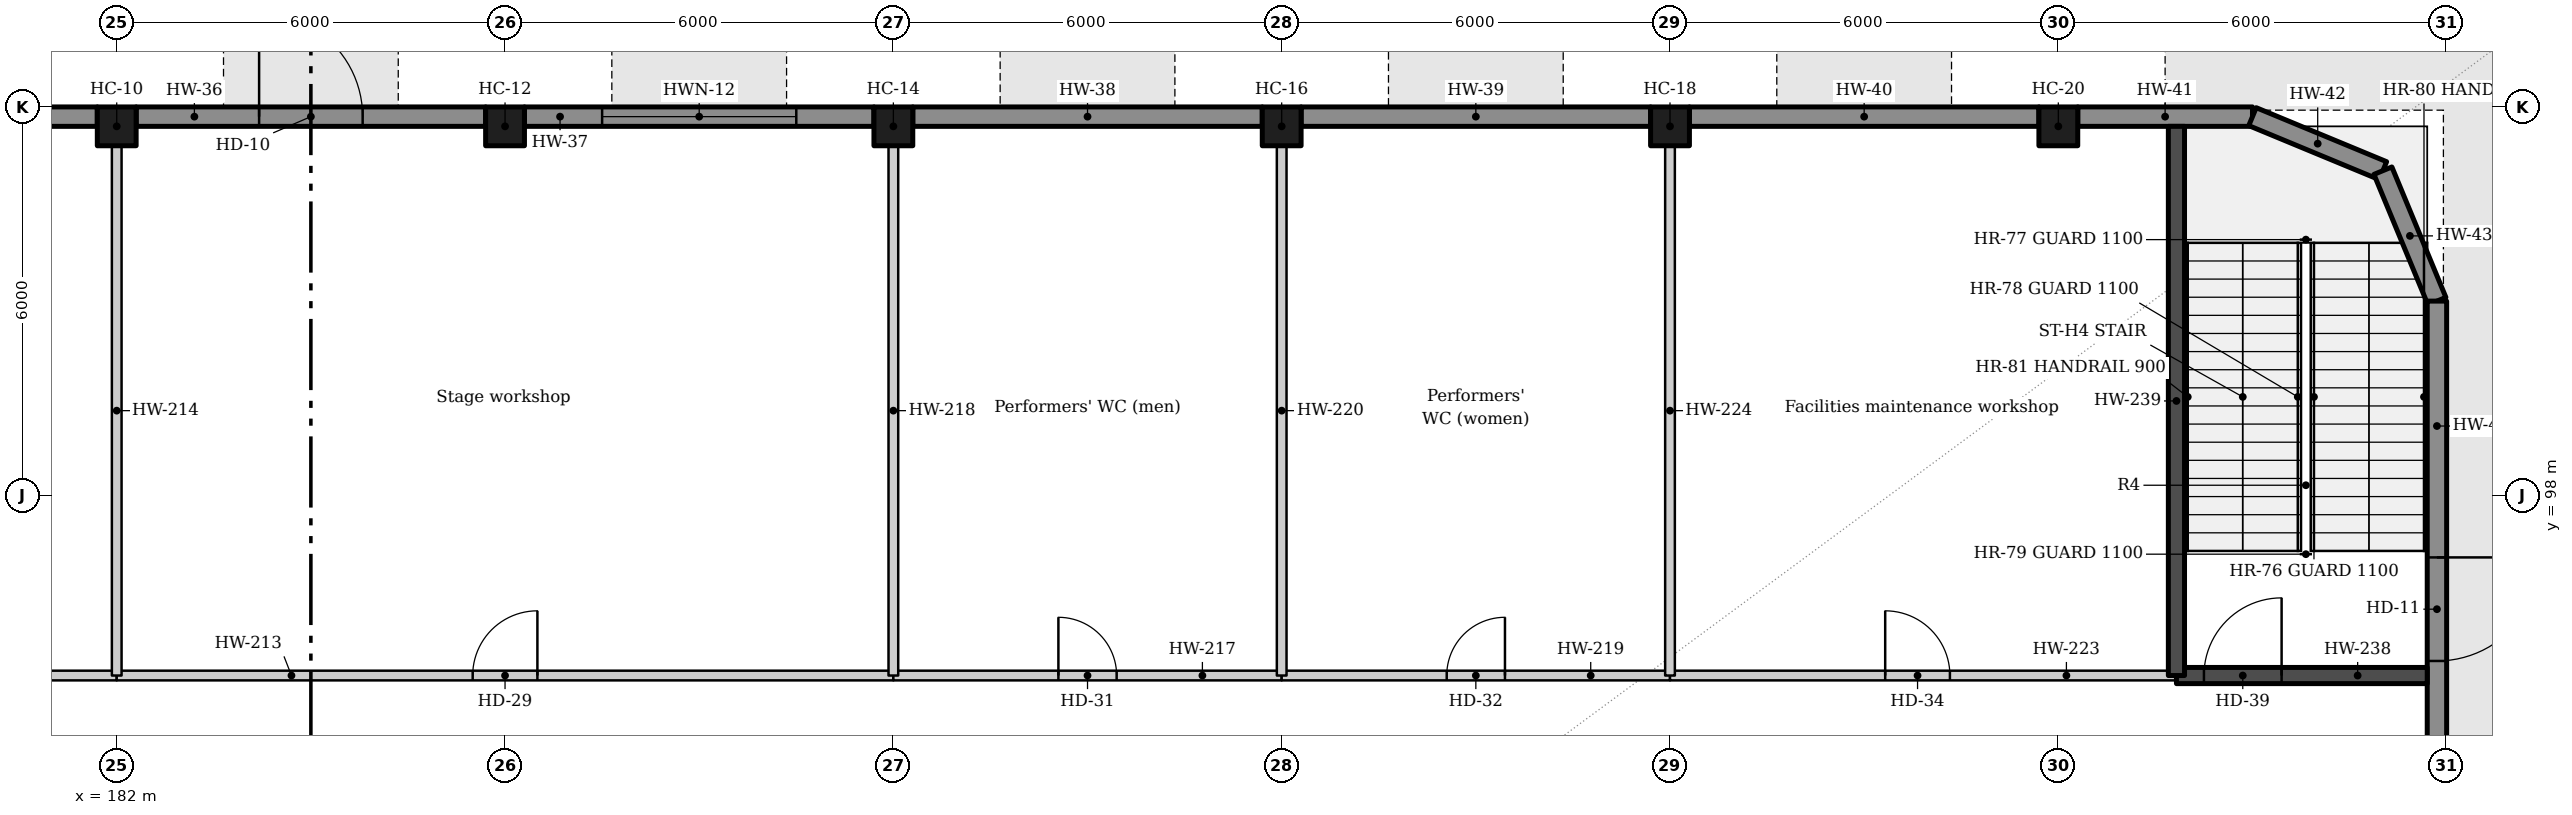
"""IFC4 building model, lengths in metres.
Left out: names, types, materials, properties, quantities, classifications, styles, units other than length and angle.
Written with IfcOpenShell. Run it as: python <this file> out.ifc"""

import sys

from ifc_helpers import new_model, si_unit, direction, frame, frame_2d, origin, origin_2d, place, context, subcontext, project, spatial, rectangle, extrude, element, fill, save


model = new_model("IFC4")
c1 = context("Model", 3, precision=1e-05, world=origin(), true_north=direction((0.0, 1.0)))
c2 = subcontext(c1, "Body", "Model", "MODEL_VIEW")
j1 = project(units=[si_unit("LENGTHUNIT", "METRE"), si_unit("PLANEANGLEUNIT", "RADIAN")], contexts=[c1])
p1 = place(None, origin())
s1 = spatial("IfcSite", under=j1, at=p1, CompositionType="ELEMENT")
p2 = place(p1, origin())
s2 = spatial("IfcBuilding", under=s1, at=p2, CompositionType="ELEMENT")
p3 = place(p2, origin())
s3 = spatial("IfcBuildingStorey", under=s2, at=p3, CompositionType="ELEMENT", Elevation=0.0)
for number, where, z_axis, x_axis in (
    (1, (182.0, 103.7, 0.0), (0.0, 0.0, 1.0), (1.0, 0.0, 0.0)),
    (2, (188.0, 103.7, 0.0), (0.0, 0.0, 1.0), (1.0, 0.0, 0.0)),
    (3, (194.0, 103.7, 0.0), (0.0, 0.0, 1.0), (1.0, 0.0, 0.0)),
    (4, (200.0, 103.7, 0.0), (0.0, 0.0, 1.0), (1.0, 0.0, 0.0)),
    (5, (206.0, 103.7, 0.0), (0.0, 0.0, 1.0), (1.0, 0.0, 0.0)),
    (6, (212.0, 103.7, 0.0), (0.0, 0.0, 1.0), (1.0, 0.0, 0.0)),
):
    element("IfcColumn", number, at=place(p3, frame(where, z_axis=z_axis, x_axis=x_axis)), inside=s3, PredefinedType="COLUMN", context=c2, shape_type="SweptSolid", body=[
        extrude(rectangle(XDim=0.6, YDim=0.6, at=origin_2d()), origin(), (0.0, 0.0, 1.0), 6.6),
    ])
p4 = place(p3, frame((176.3, 103.85, 0.0), z_axis=(0.0, 0.0, 1.0), x_axis=(1.0, 0.0, 0.0)))
e7 = element("IfcWall", 7, at=p4, inside=s3, PredefinedType="SOLIDWALL", context=c2, shape_type="SweptSolid", body=[
    extrude(rectangle(XDim=5.4, YDim=0.3, at=frame_2d((2.7, 0.0))), origin(), (0.0, 0.0, 1.0), 6.6),
])
p5 = place(p4, frame((1.9, 0.0, 0.0)))
e8 = element("IfcOpeningElement", 8, at=p5, cuts=e7, PredefinedType="OPENING", context=c2, shape_type="SweptSolid", body=[
    extrude(rectangle(XDim=1.6, YDim=2.4, at=frame_2d((0.8, 1.2))), frame((0.0, 0.16, 0.0), z_axis=(0.0, -1.0, 0.0), x_axis=(1.0, 0.0, 0.0)), (0.0, 0.0, 1.0), 0.32),
])
p6 = place(p3, frame((182.3, 103.85, 0.0), z_axis=(0.0, 0.0, 1.0), x_axis=(1.0, 0.0, 0.0)))
e9 = element("IfcWall", 9, at=p6, inside=s3, PredefinedType="SOLIDWALL", context=c2, shape_type="SweptSolid", body=[
    extrude(rectangle(XDim=5.4, YDim=0.3, at=frame_2d((2.7, 0.0))), origin(), (0.0, 0.0, 1.0), 6.6),
])
p7 = place(p6, frame((1.9, 0.0, 0.0)))
e10 = element("IfcOpeningElement", 10, at=p7, cuts=e9, PredefinedType="OPENING", context=c2, shape_type="SweptSolid", body=[
    extrude(rectangle(XDim=1.6, YDim=2.4, at=frame_2d((0.8, 1.2))), frame((0.0, 0.16, 0.0), z_axis=(0.0, -1.0, 0.0), x_axis=(1.0, 0.0, 0.0)), (0.0, 0.0, 1.0), 0.32),
])
p8 = place(p3, frame((188.3, 103.85, 0.0), z_axis=(0.0, 0.0, 1.0), x_axis=(1.0, 0.0, 0.0)))
e11 = element("IfcWall", 11, at=p8, inside=s3, PredefinedType="SOLIDWALL", context=c2, shape_type="SweptSolid", body=[
    extrude(rectangle(XDim=5.4, YDim=0.3, at=frame_2d((2.7, 0.0))), origin(), (0.0, 0.0, 1.0), 6.6),
])
p9 = place(p8, frame((1.2, 0.0, 0.9)))
e12 = element("IfcOpeningElement", 12, at=p9, cuts=e11, PredefinedType="OPENING", context=c2, shape_type="SweptSolid", body=[
    extrude(rectangle(XDim=3.0, YDim=1.8, at=frame_2d((1.5, 0.9))), frame((0.0, 0.16, 0.0), z_axis=(0.0, -1.0, 0.0), x_axis=(1.0, 0.0, 0.0)), (0.0, 0.0, 1.0), 0.32),
])
for number, where, z_axis, x_axis in (
    (13, (194.3, 103.85, 0.0), (0.0, 0.0, 1.0), (1.0, 0.0, 0.0)),
    (14, (200.3, 103.85, 0.0), (0.0, 0.0, 1.0), (1.0, 0.0, 0.0)),
    (15, (206.3, 103.85, 0.0), (0.0, 0.0, 1.0), (1.0, 0.0, 0.0)),
):
    element("IfcWall", number, at=place(p3, frame(where, z_axis=z_axis, x_axis=x_axis)), inside=s3, PredefinedType="SOLIDWALL", context=c2, shape_type="SweptSolid", body=[
        extrude(rectangle(XDim=5.4, YDim=0.3, at=frame_2d((2.7, 0.0))), origin(), (0.0, 0.0, 1.0), 6.6),
    ])
p10 = place(p3, frame((212.3, 103.85, 0.0), z_axis=(0.0, 0.0, 1.0), x_axis=(1.0, 0.0, 0.0)))
e16 = element("IfcWall", 16, at=p10, inside=s3, PredefinedType="SOLIDWALL", context=c2, shape_type="SweptSolid", body=[
    extrude(rectangle(XDim=2.7, YDim=0.3, at=frame_2d((1.35, 0.0))), origin(), (0.0, 0.0, 1.0), 6.6),
])
for number, where, z_axis, x_axis in (
    (17, (215.0, 103.85, 0.0), (0.0, 0.0, 1.0), (0.924, -0.383, 0.0)),
    (18, (217.015, 103.015, 0.0), (0.0, 0.0, 1.0), (0.383, -0.924, 0.0)),
):
    element("IfcWall", number, at=place(p3, frame(where, z_axis=z_axis, x_axis=x_axis)), inside=s3, PredefinedType="SOLIDWALL", context=c2, shape_type="SweptSolid", body=[
        extrude(rectangle(XDim=2.181, YDim=0.3, at=frame_2d((1.091, 0.0))), origin(), (0.0, 0.0, 1.0), 6.6),
    ])
p11 = place(p3, frame((217.85, 101.0, 0.0), z_axis=(0.0, 0.0, 1.0), x_axis=(0.0, -1.0, 0.0)))
e19 = element("IfcWall", 19, at=p11, inside=s3, PredefinedType="SOLIDWALL", context=c2, shape_type="SweptSolid", body=[
    extrude(rectangle(XDim=8.7, YDim=0.3, at=frame_2d((4.35, 0.0))), origin(), (0.0, 0.0, 1.0), 6.6),
])
p12 = place(p11, frame((3.96, 0.0, 0.0)))
e20 = element("IfcOpeningElement", 20, at=p12, cuts=e19, PredefinedType="OPENING", context=c2, shape_type="SweptSolid", body=[
    extrude(rectangle(XDim=1.6, YDim=2.4, at=frame_2d((0.8, 1.2))), frame((0.0, 0.16, 0.0), z_axis=(0.0, -1.0, 0.0), x_axis=(1.0, 0.0, 0.0)), (0.0, 0.0, 1.0), 0.32),
])
p13 = place(p3, frame((170.0, 95.215, 0.0), z_axis=(0.0, 0.0, 1.0), x_axis=(1.0, 0.0, 0.0)))
e21 = element("IfcWall", 21, at=p13, inside=s3, PredefinedType="PARTITIONING", context=c2, shape_type="SweptSolid", body=[
    extrude(rectangle(XDim=12.0, YDim=0.15, at=frame_2d((6.0, 0.0))), origin(), (0.0, 0.0, 1.0), 6.25),
])
p14 = place(p13, frame((5.5, 0.0, 0.0)))
e22 = element("IfcOpeningElement", 22, at=p14, cuts=e21, PredefinedType="OPENING", context=c2, shape_type="SweptSolid", body=[
    extrude(rectangle(XDim=1.0, YDim=2.1, at=frame_2d((0.5, 1.05))), frame((0.0, 0.085, 0.0), z_axis=(0.0, -1.0, 0.0), x_axis=(1.0, 0.0, 0.0)), (0.0, 0.0, 1.0), 0.17),
])
p15 = place(p3, frame((182.0, 95.215, 0.0), z_axis=(0.0, 0.0, 1.0), x_axis=(1.0, 0.0, 0.0)))
e23 = element("IfcWall", 23, at=p15, inside=s3, PredefinedType="PARTITIONING", context=c2, shape_type="SweptSolid", body=[
    extrude(rectangle(XDim=12.0, YDim=0.15, at=frame_2d((6.0, 0.0))), origin(), (0.0, 0.0, 1.0), 6.25),
])
p16 = place(p15, frame((5.5, 0.0, 0.0)))
e24 = element("IfcOpeningElement", 24, at=p16, cuts=e23, PredefinedType="OPENING", context=c2, shape_type="SweptSolid", body=[
    extrude(rectangle(XDim=1.0, YDim=2.1, at=frame_2d((0.5, 1.05))), frame((0.0, 0.085, 0.0), z_axis=(0.0, -1.0, 0.0), x_axis=(1.0, 0.0, 0.0)), (0.0, 0.0, 1.0), 0.17),
])
p17 = place(p3, frame((182.0, 103.4, 0.0), z_axis=(0.0, 0.0, 1.0), x_axis=(0.0, -1.0, 0.0)))
e25 = element("IfcWall", 25, at=p17, inside=s3, PredefinedType="PARTITIONING", context=c2, shape_type="SweptSolid", body=[
    extrude(rectangle(XDim=8.185, YDim=0.15, at=frame_2d((4.092, 0.0))), origin(), (0.0, 0.0, 1.0), 6.25),
])
p18 = place(p3, frame((194.0, 95.215, 0.0), z_axis=(0.0, 0.0, 1.0), x_axis=(1.0, 0.0, 0.0)))
e26 = element("IfcWall", 26, at=p18, inside=s3, PredefinedType="PLUMBINGWALL", context=c2, shape_type="SweptSolid", body=[
    extrude(rectangle(XDim=6.0, YDim=0.15, at=frame_2d((3.0, 0.0))), origin(), (0.0, 0.0, 1.0), 6.25),
])
p19 = place(p18, frame((2.55, 0.0, 0.0)))
e27 = element("IfcOpeningElement", 27, at=p19, cuts=e26, PredefinedType="OPENING", context=c2, shape_type="SweptSolid", body=[
    extrude(rectangle(XDim=0.9, YDim=2.1, at=frame_2d((0.45, 1.05))), frame((0.0, 0.085, 0.0), z_axis=(0.0, -1.0, 0.0), x_axis=(1.0, 0.0, 0.0)), (0.0, 0.0, 1.0), 0.17),
])
p20 = place(p3, frame((194.0, 103.4, 0.0), z_axis=(0.0, 0.0, 1.0), x_axis=(0.0, -1.0, 0.0)))
e28 = element("IfcWall", 28, at=p20, inside=s3, PredefinedType="PLUMBINGWALL", context=c2, shape_type="SweptSolid", body=[
    extrude(rectangle(XDim=8.185, YDim=0.15, at=frame_2d((4.092, 0.0))), origin(), (0.0, 0.0, 1.0), 6.25),
])
p21 = place(p3, frame((200.0, 95.215, 0.0), z_axis=(0.0, 0.0, 1.0), x_axis=(1.0, 0.0, 0.0)))
e29 = element("IfcWall", 29, at=p21, inside=s3, PredefinedType="PLUMBINGWALL", context=c2, shape_type="SweptSolid", body=[
    extrude(rectangle(XDim=6.0, YDim=0.15, at=frame_2d((3.0, 0.0))), origin(), (0.0, 0.0, 1.0), 6.25),
])
p22 = place(p21, frame((2.55, 0.0, 0.0)))
e30 = element("IfcOpeningElement", 30, at=p22, cuts=e29, PredefinedType="OPENING", context=c2, shape_type="SweptSolid", body=[
    extrude(rectangle(XDim=0.9, YDim=2.1, at=frame_2d((0.45, 1.05))), frame((0.0, 0.085, 0.0), z_axis=(0.0, -1.0, 0.0), x_axis=(1.0, 0.0, 0.0)), (0.0, 0.0, 1.0), 0.17),
])
p23 = place(p3, frame((200.0, 103.4, 0.0), z_axis=(0.0, 0.0, 1.0), x_axis=(0.0, -1.0, 0.0)))
e31 = element("IfcWall", 31, at=p23, inside=s3, PredefinedType="PLUMBINGWALL", context=c2, shape_type="SweptSolid", body=[
    extrude(rectangle(XDim=8.185, YDim=0.15, at=frame_2d((4.092, 0.0))), origin(), (0.0, 0.0, 1.0), 6.25),
])
p24 = place(p3, frame((206.0, 95.215, 0.0), z_axis=(0.0, 0.0, 1.0), x_axis=(1.0, 0.0, 0.0)))
e32 = element("IfcWall", 32, at=p24, inside=s3, PredefinedType="PARTITIONING", context=c2, shape_type="SweptSolid", body=[
    extrude(rectangle(XDim=7.825, YDim=0.15, at=frame_2d((3.913, 0.0))), origin(), (0.0, 0.0, 1.0), 6.25),
])
p25 = place(p24, frame((3.325, 0.0, 0.0)))
e33 = element("IfcOpeningElement", 33, at=p25, cuts=e32, PredefinedType="OPENING", context=c2, shape_type="SweptSolid", body=[
    extrude(rectangle(XDim=1.0, YDim=2.1, at=frame_2d((0.5, 1.05))), frame((0.0, 0.085, 0.0), z_axis=(0.0, -1.0, 0.0), x_axis=(1.0, 0.0, 0.0)), (0.0, 0.0, 1.0), 0.17),
])
p26 = place(p3, frame((206.0, 103.4, 0.0), z_axis=(0.0, 0.0, 1.0), x_axis=(0.0, -1.0, 0.0)))
e34 = element("IfcWall", 34, at=p26, inside=s3, PredefinedType="PLUMBINGWALL", context=c2, shape_type="SweptSolid", body=[
    extrude(rectangle(XDim=8.185, YDim=0.15, at=frame_2d((4.092, 0.0))), origin(), (0.0, 0.0, 1.0), 6.25),
])
p27 = place(p3, frame((213.825, 95.215, 0.0), z_axis=(0.0, 0.0, 1.0), x_axis=(1.0, 0.0, 0.0)))
e35 = element("IfcWall", 35, at=p27, inside=s3, PredefinedType="SOLIDWALL", context=c2, shape_type="SweptSolid", body=[
    extrude(rectangle(XDim=3.875, YDim=0.25, at=frame_2d((1.938, 0.0))), origin(), (0.0, 0.0, 1.0), 6.6),
])
p28 = place(p27, frame((0.425, 0.0, 0.0)))
e36 = element("IfcOpeningElement", 36, at=p28, cuts=e35, PredefinedType="OPENING", context=c2, shape_type="SweptSolid", body=[
    extrude(rectangle(XDim=1.2, YDim=2.1, at=frame_2d((0.6, 1.05))), frame((0.0, 0.135, 0.0), z_axis=(0.0, -1.0, 0.0), x_axis=(1.0, 0.0, 0.0)), (0.0, 0.0, 1.0), 0.27),
])
p29 = place(p3, frame((213.825, 95.215, 0.0), z_axis=(0.0, 0.0, 1.0), x_axis=(0.0, 1.0, 0.0)))
e37 = element("IfcWall", 37, at=p29, inside=s3, PredefinedType="SOLIDWALL", context=c2, shape_type="SweptSolid", body=[
    extrude(rectangle(XDim=8.485, YDim=0.25, at=frame_2d((4.242, 0.0))), origin(), (0.0, 0.0, 1.0), 6.6),
])
p30 = place(p7, origin())
e38 = element("IfcDoor", 38, at=p30, inside=s3, OperationType="SINGLE_SWING_LEFT", PredefinedType="DOOR", context=c2, shape_type="SweptSolid", body=[
    extrude(rectangle(XDim=1.6, YDim=2.4, at=frame_2d((0.8, 1.2))), frame((0.0, 0.025, 0.0), z_axis=(0.0, -1.0, 0.0), x_axis=(1.0, 0.0, 0.0)), (0.0, 0.0, 1.0), 0.05),
])
fill(e10, e38)
p31 = place(p9, origin())
e39 = element("IfcWindow", 39, at=p31, inside=s3, PartitioningType="SINGLE_PANEL", PredefinedType="WINDOW", context=c2, shape_type="SweptSolid", body=[
    extrude(rectangle(XDim=3.0, YDim=1.8, at=frame_2d((1.5, 0.9))), frame((0.0, 0.03, 0.0), z_axis=(0.0, -1.0, 0.0), x_axis=(1.0, 0.0, 0.0)), (0.0, 0.0, 1.0), 0.06),
])
fill(e12, e39)
p32 = place(p12, origin())
e40 = element("IfcDoor", 40, at=p32, inside=s3, OperationType="SINGLE_SWING_LEFT", PredefinedType="DOOR", context=c2, shape_type="SweptSolid", body=[
    extrude(rectangle(XDim=1.6, YDim=2.4, at=frame_2d((0.8, 1.2))), frame((0.0, 0.025, 0.0), z_axis=(0.0, -1.0, 0.0), x_axis=(1.0, 0.0, 0.0)), (0.0, 0.0, 1.0), 0.05),
])
fill(e20, e40)
p33 = place(p16, origin())
e41 = element("IfcDoor", 41, at=p33, inside=s3, OperationType="SINGLE_SWING_RIGHT", PredefinedType="DOOR", context=c2, shape_type="SweptSolid", body=[
    extrude(rectangle(XDim=1.0, YDim=2.1, at=frame_2d((0.5, 1.05))), frame((0.0, 0.025, 0.0), z_axis=(0.0, -1.0, 0.0), x_axis=(1.0, 0.0, 0.0)), (0.0, 0.0, 1.0), 0.05),
])
fill(e24, e41)
p34 = place(p19, origin())
e42 = element("IfcDoor", 42, at=p34, inside=s3, OperationType="SINGLE_SWING_LEFT", PredefinedType="DOOR", context=c2, shape_type="SweptSolid", body=[
    extrude(rectangle(XDim=0.9, YDim=2.1, at=frame_2d((0.45, 1.05))), frame((0.0, 0.025, 0.0), z_axis=(0.0, -1.0, 0.0), x_axis=(1.0, 0.0, 0.0)), (0.0, 0.0, 1.0), 0.05),
])
fill(e27, e42)
p35 = place(p22, origin())
e43 = element("IfcDoor", 43, at=p35, inside=s3, OperationType="SINGLE_SWING_RIGHT", PredefinedType="DOOR", context=c2, shape_type="SweptSolid", body=[
    extrude(rectangle(XDim=0.9, YDim=2.1, at=frame_2d((0.45, 1.05))), frame((0.0, 0.025, 0.0), z_axis=(0.0, -1.0, 0.0), x_axis=(1.0, 0.0, 0.0)), (0.0, 0.0, 1.0), 0.05),
])
fill(e30, e43)
p36 = place(p25, origin())
e44 = element("IfcDoor", 44, at=p36, inside=s3, OperationType="SINGLE_SWING_LEFT", PredefinedType="DOOR", context=c2, shape_type="SweptSolid", body=[
    extrude(rectangle(XDim=1.0, YDim=2.1, at=frame_2d((0.5, 1.05))), frame((0.0, 0.025, 0.0), z_axis=(0.0, -1.0, 0.0), x_axis=(1.0, 0.0, 0.0)), (0.0, 0.0, 1.0), 0.05),
])
fill(e33, e44)
p37 = place(p28, origin())
e45 = element("IfcDoor", 45, at=p37, inside=s3, OperationType="SINGLE_SWING_RIGHT", PredefinedType="DOOR", context=c2, shape_type="SweptSolid", body=[
    extrude(rectangle(XDim=1.2, YDim=2.1, at=frame_2d((0.6, 1.05))), frame((0.0, 0.025, 0.0), z_axis=(0.0, -1.0, 0.0), x_axis=(1.0, 0.0, 0.0)), (0.0, 0.0, 1.0), 0.05),
])
fill(e36, e45)
save(model, sys.argv[1])
